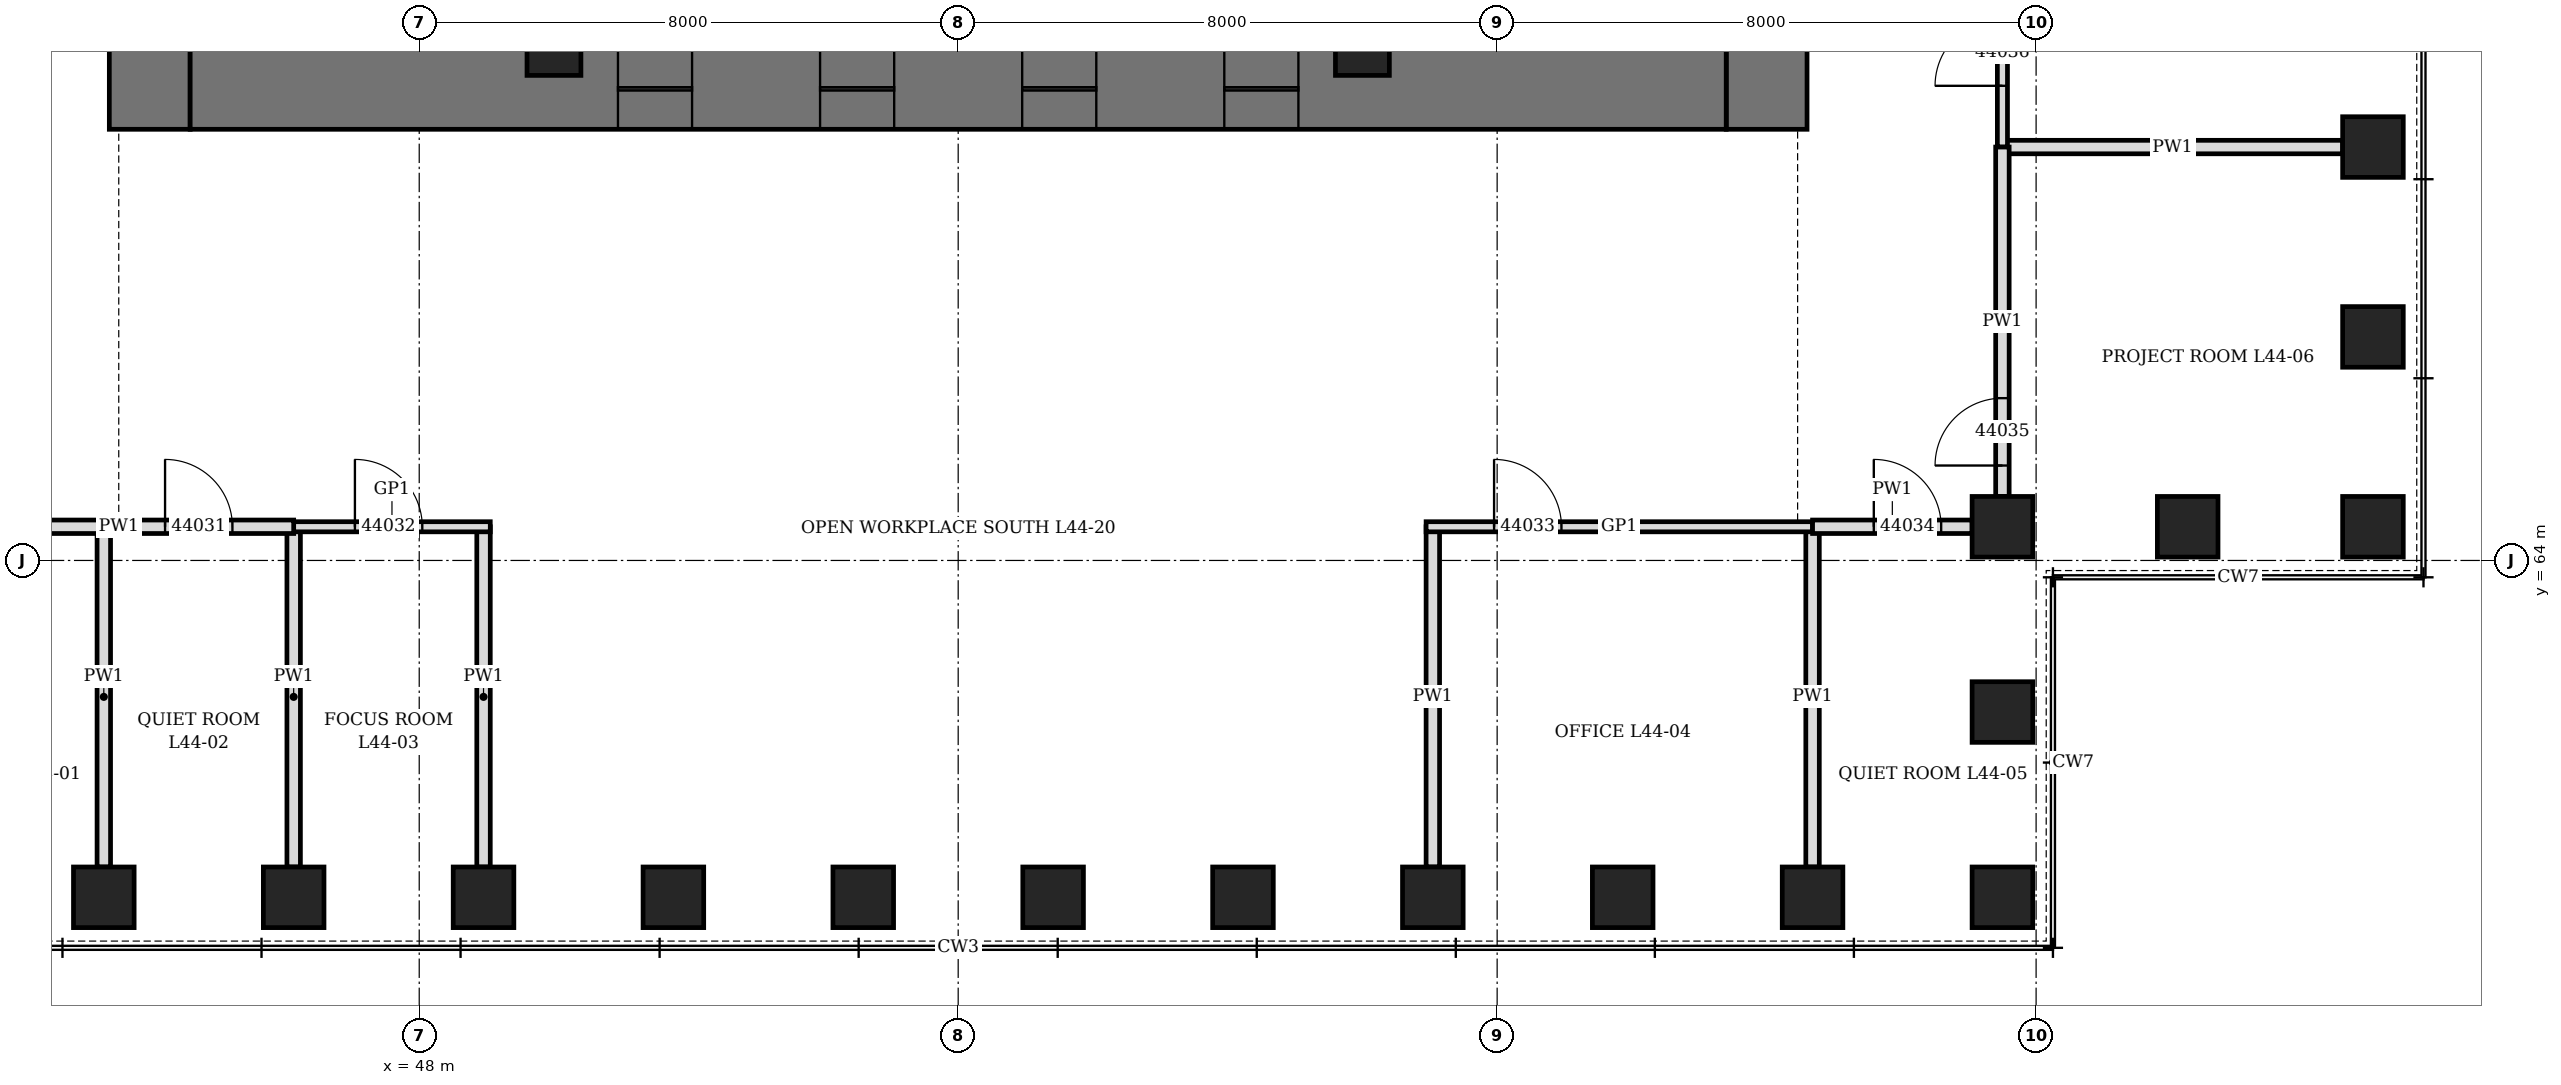
"""IFC4 building model, lengths in metres.
Left out: names, types, materials, properties, quantities, classifications, styles, units other than length and angle.
Written with IfcOpenShell. Run it as: python <this file> out.ifc"""

import sys

from ifc_helpers import new_model, si_unit, direction, frame, frame_2d, origin, origin_2d, place, context, subcontext, project, spatial, rectangle, hollow_rectangle, extrude, element, fill, save


model = new_model("IFC4")
c1 = context("Model", 3, precision=1e-05, world=origin(), true_north=direction((0.0, 1.0)))
c2 = subcontext(c1, "Body", "Model", "MODEL_VIEW")
j1 = project(units=[si_unit("LENGTHUNIT", "METRE"), si_unit("PLANEANGLEUNIT", "RADIAN")], contexts=[c1])
p1 = place(None, origin())
s1 = spatial("IfcSite", under=j1, at=p1, CompositionType="ELEMENT")
p2 = place(p1, origin())
s2 = spatial("IfcBuilding", under=s1, at=p2, CompositionType="ELEMENT")
p3 = place(p2, frame((0.0, 0.0, 198.1)))
s3 = spatial("IfcBuildingStorey", under=s2, at=p3, CompositionType="ELEMENT", Elevation=198.1)
for number, where, z_axis, x_axis in (
    (1, (43.318, 59.0, 0.0), (0.0, 0.0, 1.0), (1.0, 0.0, 0.0)),
    (2, (46.136, 59.0, 0.0), (0.0, 0.0, 1.0), (1.0, 0.0, 0.0)),
    (3, (48.955, 59.0, 0.0), (0.0, 0.0, 1.0), (1.0, 0.0, 0.0)),
    (4, (51.773, 59.0, 0.0), (0.0, 0.0, 1.0), (1.0, 0.0, 0.0)),
    (5, (54.591, 59.0, 0.0), (0.0, 0.0, 1.0), (1.0, 0.0, 0.0)),
    (6, (57.409, 59.0, 0.0), (0.0, 0.0, 1.0), (1.0, 0.0, 0.0)),
    (7, (60.227, 59.0, 0.0), (0.0, 0.0, 1.0), (1.0, 0.0, 0.0)),
    (8, (63.045, 59.0, 0.0), (0.0, 0.0, 1.0), (1.0, 0.0, 0.0)),
    (9, (65.864, 59.0, 0.0), (0.0, 0.0, 1.0), (1.0, 0.0, 0.0)),
    (10, (68.682, 59.0, 0.0), (0.0, 0.0, 1.0), (1.0, 0.0, 0.0)),
    (11, (71.5, 59.0, 0.0), (0.0, 0.0, 1.0), (0.0, 1.0, 0.0)),
    (12, (71.5, 61.75, 0.0), (0.0, 0.0, 1.0), (0.0, 1.0, 0.0)),
    (13, (71.5, 64.5, 0.0), (0.0, 0.0, 1.0), (1.0, 0.0, 0.0)),
    (14, (74.25, 64.5, 0.0), (0.0, 0.0, 1.0), (1.0, 0.0, 0.0)),
    (15, (77.0, 64.5, 0.0), (0.0, 0.0, 1.0), (0.0, 1.0, 0.0)),
    (16, (77.0, 67.318, 0.0), (0.0, 0.0, 1.0), (0.0, 1.0, 0.0)),
    (17, (77.0, 70.136, 0.0), (0.0, 0.0, 1.0), (0.0, 1.0, 0.0)),
):
    element("IfcColumn", number, at=place(p3, frame(where, z_axis=z_axis, x_axis=x_axis)), inside=s3, PredefinedType="COLUMN", context=c2, shape_type="SweptSolid", body=[
        extrude(hollow_rectangle(XDim=0.9, YDim=0.9, WallThickness=0.12, at=origin_2d()), origin(), (0.0, 0.0, 1.0), 4.2),
    ])
p4 = place(p3, frame((44.0, 70.4, 0.0), z_axis=(0.0, 0.0, 1.0), x_axis=(0.0, 1.0, 0.0)))
e18 = element("IfcWall", 18, at=p4, inside=s3, PredefinedType="SHEAR", context=c2, shape_type="SweptSolid", body=[
    extrude(rectangle(XDim=19.2, YDim=1.2, at=frame_2d((9.6, 0.0))), origin(), (0.0, 0.0, 1.0), 4.2),
])
p5 = place(p4, frame((8.6, 0.0, 0.0)))
e19 = element("IfcOpeningElement", 19, at=p5, cuts=e18, PredefinedType="OPENING", context=c2, shape_type="SweptSolid", body=[
    extrude(rectangle(XDim=2.0, YDim=2.4, at=frame_2d((1.0, 1.2))), frame((0.0, 0.61, 0.0), z_axis=(0.0, -1.0, 0.0), x_axis=(1.0, 0.0, 0.0)), (0.0, 0.0, 1.0), 1.22),
])
p6 = place(p3, frame((68.0, 70.4, 0.0), z_axis=(0.0, 0.0, 1.0), x_axis=(0.0, 1.0, 0.0)))
e20 = element("IfcWall", 20, at=p6, inside=s3, PredefinedType="SHEAR", context=c2, shape_type="SweptSolid", body=[
    extrude(rectangle(XDim=19.2, YDim=1.2, at=frame_2d((9.6, 0.0))), origin(), (0.0, 0.0, 1.0), 4.2),
])
p7 = place(p6, frame((8.6, 0.0, 0.0)))
e21 = element("IfcOpeningElement", 21, at=p7, cuts=e20, PredefinedType="OPENING", context=c2, shape_type="SweptSolid", body=[
    extrude(rectangle(XDim=2.0, YDim=2.4, at=frame_2d((1.0, 1.2))), frame((0.0, 0.61, 0.0), z_axis=(0.0, -1.0, 0.0), x_axis=(1.0, 0.0, 0.0)), (0.0, 0.0, 1.0), 1.22),
])
p8 = place(p3, frame((44.6, 71.0, 0.0), z_axis=(0.0, 0.0, 1.0), x_axis=(1.0, 0.0, 0.0)))
e22 = element("IfcWall", 22, at=p8, inside=s3, PredefinedType="SHEAR", context=c2, shape_type="SweptSolid", body=[
    extrude(rectangle(XDim=22.8, YDim=1.2, at=frame_2d((11.4, 0.0))), origin(), (0.0, 0.0, 1.0), 4.2),
])
p9 = place(p8, frame((6.35, 0.0, 0.0)))
e23 = element("IfcOpeningElement", 23, at=p9, cuts=e22, PredefinedType="OPENING", context=c2, shape_type="SweptSolid", body=[
    extrude(rectangle(XDim=1.1, YDim=2.2, at=frame_2d((0.55, 1.1))), frame((0.0, 0.61, 0.0), z_axis=(0.0, -1.0, 0.0), x_axis=(1.0, 0.0, 0.0)), (0.0, 0.0, 1.0), 1.22),
])
p10 = place(p8, frame((9.35, 0.0, 0.0)))
e24 = element("IfcOpeningElement", 24, at=p10, cuts=e22, PredefinedType="OPENING", context=c2, shape_type="SweptSolid", body=[
    extrude(rectangle(XDim=1.1, YDim=2.2, at=frame_2d((0.55, 1.1))), frame((0.0, 0.61, 0.0), z_axis=(0.0, -1.0, 0.0), x_axis=(1.0, 0.0, 0.0)), (0.0, 0.0, 1.0), 1.22),
])
p11 = place(p8, frame((12.35, 0.0, 0.0)))
e25 = element("IfcOpeningElement", 25, at=p11, cuts=e22, PredefinedType="OPENING", context=c2, shape_type="SweptSolid", body=[
    extrude(rectangle(XDim=1.1, YDim=2.2, at=frame_2d((0.55, 1.1))), frame((0.0, 0.61, 0.0), z_axis=(0.0, -1.0, 0.0), x_axis=(1.0, 0.0, 0.0)), (0.0, 0.0, 1.0), 1.22),
])
p12 = place(p8, frame((15.35, 0.0, 0.0)))
e26 = element("IfcOpeningElement", 26, at=p12, cuts=e22, PredefinedType="OPENING", context=c2, shape_type="SweptSolid", body=[
    extrude(rectangle(XDim=1.1, YDim=2.2, at=frame_2d((0.55, 1.1))), frame((0.0, 0.61, 0.0), z_axis=(0.0, -1.0, 0.0), x_axis=(1.0, 0.0, 0.0)), (0.0, 0.0, 1.0), 1.22),
])
for number, where, z_axis, x_axis in (
    (27, (50.0, 71.6, 0.0), (0.0, 0.0, 1.0), (1.0, 0.0, 0.0)),
    (28, (62.0, 71.6, 0.0), (0.0, 0.0, 1.0), (1.0, 0.0, 0.0)),
):
    element("IfcColumn", number, at=place(p3, frame(where, z_axis=z_axis, x_axis=x_axis)), inside=s3, PredefinedType="COLUMN", context=c2, shape_type="SweptSolid", body=[
        extrude(hollow_rectangle(XDim=0.8, YDim=0.8, WallThickness=0.1, at=origin_2d()), origin(), (0.0, 0.0, 1.0), 4.2),
    ])
for number, where, z_axis, x_axis in (
    (29, (43.318, 59.45, 0.0), (0.0, 0.0, 1.0), (0.0, 1.0, 0.0)),
    (30, (46.136, 59.45, 0.0), (0.0, 0.0, 1.0), (0.0, 1.0, 0.0)),
    (31, (48.955, 59.45, 0.0), (0.0, 0.0, 1.0), (0.0, 1.0, 0.0)),
    (32, (63.045, 59.45, 0.0), (0.0, 0.0, 1.0), (0.0, 1.0, 0.0)),
    (33, (68.682, 59.45, 0.0), (0.0, 0.0, 1.0), (0.0, 1.0, 0.0)),
    (34, (71.5, 70.136, 0.0), (0.0, 0.0, 1.0), (1.0, 0.0, 0.0)),
):
    element("IfcWall", number, at=place(p3, frame(where, z_axis=z_axis, x_axis=x_axis)), inside=s3, PredefinedType="PARTITIONING", context=c2, shape_type="SweptSolid", body=[
        extrude(rectangle(XDim=5.05, YDim=0.2, at=frame_2d((2.525, 0.0))), origin(), (0.0, 0.0, 1.0), 3.428),
    ])
p13 = place(p3, frame((46.136, 64.5, 0.0), z_axis=(0.0, 0.0, 1.0), x_axis=(1.0, 0.0, 0.0)))
e35 = element("IfcWall", 35, at=p13, inside=s3, PredefinedType="PARTITIONING", context=c2, shape_type="SweptSolid", body=[
    extrude(rectangle(XDim=2.918, YDim=0.15, at=frame_2d((1.459, 0.0))), origin(), (0.0, 0.0, 1.0), 4.04),
])
p14 = place(p13, frame((0.909, 0.0, 0.0)))
e36 = element("IfcOpeningElement", 36, at=p14, cuts=e35, PredefinedType="OPENING", context=c2, shape_type="SweptSolid", body=[
    extrude(rectangle(XDim=1.0, YDim=2.4, at=frame_2d((0.5, 1.2))), frame((0.0, 0.085, 0.0), z_axis=(0.0, -1.0, 0.0), x_axis=(1.0, 0.0, 0.0)), (0.0, 0.0, 1.0), 0.17),
])
p15 = place(p3, frame((62.946, 64.5, 0.0), z_axis=(0.0, 0.0, 1.0), x_axis=(1.0, 0.0, 0.0)))
e37 = element("IfcWall", 37, at=p15, inside=s3, PredefinedType="PARTITIONING", context=c2, shape_type="SweptSolid", body=[
    extrude(rectangle(XDim=5.736, YDim=0.15, at=frame_2d((2.868, 0.0))), origin(), (0.0, 0.0, 1.0), 4.04),
])
p16 = place(p15, frame((1.009, 0.0, 0.0)))
e38 = element("IfcOpeningElement", 38, at=p16, cuts=e37, PredefinedType="OPENING", context=c2, shape_type="SweptSolid", body=[
    extrude(rectangle(XDim=1.0, YDim=2.1, at=frame_2d((0.5, 1.05))), frame((0.0, 0.085, 0.0), z_axis=(0.0, -1.0, 0.0), x_axis=(1.0, 0.0, 0.0)), (0.0, 0.0, 1.0), 0.17),
])
p17 = place(p3, frame((40.95, 64.5, 0.0), z_axis=(0.0, 0.0, 1.0), x_axis=(1.0, 0.0, 0.0)))
e39 = element("IfcWall", 39, at=p17, inside=s3, PredefinedType="PARTITIONING", context=c2, shape_type="SweptSolid", body=[
    extrude(rectangle(XDim=5.187, YDim=0.2, at=frame_2d((2.593, 0.0))), origin(), (0.0, 0.0, 1.0), 4.04),
])
p18 = place(p17, frame((0.459, 0.0, 0.0)))
e40 = element("IfcOpeningElement", 40, at=p18, cuts=e39, PredefinedType="OPENING", context=c2, shape_type="SweptSolid", body=[
    extrude(rectangle(XDim=1.0, YDim=2.1, at=frame_2d((0.5, 1.05))), frame((0.0, 0.11, 0.0), z_axis=(0.0, -1.0, 0.0), x_axis=(1.0, 0.0, 0.0)), (0.0, 0.0, 1.0), 0.22),
])
p19 = place(p17, frame((3.277, 0.0, 0.0)))
e41 = element("IfcOpeningElement", 41, at=p19, cuts=e39, PredefinedType="OPENING", context=c2, shape_type="SweptSolid", body=[
    extrude(rectangle(XDim=1.0, YDim=2.1, at=frame_2d((0.5, 1.05))), frame((0.0, 0.11, 0.0), z_axis=(0.0, -1.0, 0.0), x_axis=(1.0, 0.0, 0.0)), (0.0, 0.0, 1.0), 0.22),
])
p20 = place(p3, frame((68.682, 64.5, 0.0), z_axis=(0.0, 0.0, 1.0), x_axis=(1.0, 0.0, 0.0)))
e42 = element("IfcWall", 42, at=p20, inside=s3, PredefinedType="PARTITIONING", context=c2, shape_type="SweptSolid", body=[
    extrude(rectangle(XDim=2.368, YDim=0.2, at=frame_2d((1.184, 0.0))), origin(), (0.0, 0.0, 1.0), 4.04),
])
p21 = place(p20, frame((0.909, 0.0, 0.0)))
e43 = element("IfcOpeningElement", 43, at=p21, cuts=e42, PredefinedType="OPENING", context=c2, shape_type="SweptSolid", body=[
    extrude(rectangle(XDim=1.0, YDim=2.1, at=frame_2d((0.5, 1.05))), frame((0.0, 0.11, 0.0), z_axis=(0.0, -1.0, 0.0), x_axis=(1.0, 0.0, 0.0)), (0.0, 0.0, 1.0), 0.22),
])
p22 = place(p3, frame((71.5, 70.136, 0.0), z_axis=(0.0, 0.0, 1.0), x_axis=(0.0, 1.0, 0.0)))
e44 = element("IfcWall", 44, at=p22, inside=s3, PredefinedType="PARTITIONING", context=c2, shape_type="SweptSolid", body=[
    extrude(rectangle(XDim=22.545, YDim=0.15, at=frame_2d((11.273, 0.0))), origin(), (0.0, 0.0, 1.0), 4.04),
])
p23 = place(p22, frame((0.909, 0.0, 0.0)))
e45 = element("IfcOpeningElement", 45, at=p23, cuts=e44, PredefinedType="OPENING", context=c2, shape_type="SweptSolid", body=[
    extrude(rectangle(XDim=1.0, YDim=2.1, at=frame_2d((0.5, 1.05))), frame((0.0, 0.085, 0.0), z_axis=(0.0, -1.0, 0.0), x_axis=(1.0, 0.0, 0.0)), (0.0, 0.0, 1.0), 0.17),
])
p24 = place(p22, frame((6.545, 0.0, 0.0)))
e46 = element("IfcOpeningElement", 46, at=p24, cuts=e44, PredefinedType="OPENING", context=c2, shape_type="SweptSolid", body=[
    extrude(rectangle(XDim=1.0, YDim=2.1, at=frame_2d((0.5, 1.05))), frame((0.0, 0.085, 0.0), z_axis=(0.0, -1.0, 0.0), x_axis=(1.0, 0.0, 0.0)), (0.0, 0.0, 1.0), 0.17),
])
p25 = place(p22, frame((12.182, 0.0, 0.0)))
e47 = element("IfcOpeningElement", 47, at=p25, cuts=e44, PredefinedType="OPENING", context=c2, shape_type="SweptSolid", body=[
    extrude(rectangle(XDim=1.0, YDim=2.1, at=frame_2d((0.5, 1.05))), frame((0.0, 0.085, 0.0), z_axis=(0.0, -1.0, 0.0), x_axis=(1.0, 0.0, 0.0)), (0.0, 0.0, 1.0), 0.17),
])
p26 = place(p22, frame((17.818, 0.0, 0.0)))
e48 = element("IfcOpeningElement", 48, at=p26, cuts=e44, PredefinedType="OPENING", context=c2, shape_type="SweptSolid", body=[
    extrude(rectangle(XDim=1.0, YDim=2.1, at=frame_2d((0.5, 1.05))), frame((0.0, 0.085, 0.0), z_axis=(0.0, -1.0, 0.0), x_axis=(1.0, 0.0, 0.0)), (0.0, 0.0, 1.0), 0.17),
])
p27 = place(p3, frame((71.5, 64.95, 0.0), z_axis=(0.0, 0.0, 1.0), x_axis=(0.0, 1.0, 0.0)))
e49 = element("IfcWall", 49, at=p27, inside=s3, PredefinedType="PARTITIONING", context=c2, shape_type="SweptSolid", body=[
    extrude(rectangle(XDim=5.187, YDim=0.2, at=frame_2d((2.593, 0.0))), origin(), (0.0, 0.0, 1.0), 4.04),
])
p28 = place(p27, frame((0.459, 0.0, 0.0)))
e50 = element("IfcOpeningElement", 50, at=p28, cuts=e49, PredefinedType="OPENING", context=c2, shape_type="SweptSolid", body=[
    extrude(rectangle(XDim=1.0, YDim=2.1, at=frame_2d((0.5, 1.05))), frame((0.0, 0.11, 0.0), z_axis=(0.0, -1.0, 0.0), x_axis=(1.0, 0.0, 0.0)), (0.0, 0.0, 1.0), 0.22),
])
p29 = place(p9, origin())
e51 = element("IfcDoor", 51, at=p29, inside=s3, OperationType="SLIDING_TO_LEFT", PredefinedType="DOOR", context=c2, shape_type="SweptSolid", body=[
    extrude(rectangle(XDim=1.1, YDim=2.2, at=frame_2d((0.55, 1.1))), frame((0.0, 0.35, 0.0), z_axis=(0.0, -1.0, 0.0), x_axis=(1.0, 0.0, 0.0)), (0.0, 0.0, 1.0), 0.7),
])
fill(e23, e51)
p30 = place(p10, origin())
e52 = element("IfcDoor", 52, at=p30, inside=s3, OperationType="SLIDING_TO_LEFT", PredefinedType="DOOR", context=c2, shape_type="SweptSolid", body=[
    extrude(rectangle(XDim=1.1, YDim=2.2, at=frame_2d((0.55, 1.1))), frame((0.0, 0.35, 0.0), z_axis=(0.0, -1.0, 0.0), x_axis=(1.0, 0.0, 0.0)), (0.0, 0.0, 1.0), 0.7),
])
fill(e24, e52)
p31 = place(p11, origin())
e53 = element("IfcDoor", 53, at=p31, inside=s3, OperationType="SLIDING_TO_LEFT", PredefinedType="DOOR", context=c2, shape_type="SweptSolid", body=[
    extrude(rectangle(XDim=1.1, YDim=2.2, at=frame_2d((0.55, 1.1))), frame((0.0, 0.35, 0.0), z_axis=(0.0, -1.0, 0.0), x_axis=(1.0, 0.0, 0.0)), (0.0, 0.0, 1.0), 0.7),
])
fill(e25, e53)
p32 = place(p12, origin())
e54 = element("IfcDoor", 54, at=p32, inside=s3, OperationType="SLIDING_TO_LEFT", PredefinedType="DOOR", context=c2, shape_type="SweptSolid", body=[
    extrude(rectangle(XDim=1.1, YDim=2.2, at=frame_2d((0.55, 1.1))), frame((0.0, 0.35, 0.0), z_axis=(0.0, -1.0, 0.0), x_axis=(1.0, 0.0, 0.0)), (0.0, 0.0, 1.0), 0.7),
])
fill(e26, e54)
p33 = place(p19, origin())
e55 = element("IfcDoor", 55, at=p33, inside=s3, OperationType="SINGLE_SWING_LEFT", PredefinedType="DOOR", context=c2, shape_type="SweptSolid", body=[
    extrude(rectangle(XDim=1.0, YDim=2.1, at=frame_2d((0.5, 1.05))), frame((0.0, 0.1, 0.0), z_axis=(0.0, -1.0, 0.0), x_axis=(1.0, 0.0, 0.0)), (0.0, 0.0, 1.0), 0.199),
])
fill(e41, e55)
p34 = place(p14, origin())
e56 = element("IfcDoor", 56, at=p34, inside=s3, OperationType="SINGLE_SWING_RIGHT", PredefinedType="DOOR", context=c2, shape_type="SweptSolid", body=[
    extrude(rectangle(XDim=1.0, YDim=2.4, at=frame_2d((0.5, 1.2))), frame((0.0, 0.075, 0.0), z_axis=(0.0, -1.0, 0.0), x_axis=(1.0, 0.0, 0.0)), (0.0, 0.0, 1.0), 0.149),
])
fill(e36, e56)
p35 = place(p16, origin())
e57 = element("IfcDoor", 57, at=p35, inside=s3, OperationType="SINGLE_SWING_LEFT", PredefinedType="DOOR", context=c2, shape_type="SweptSolid", body=[
    extrude(rectangle(XDim=1.0, YDim=2.1, at=frame_2d((0.5, 1.05))), frame((0.0, 0.075, 0.0), z_axis=(0.0, -1.0, 0.0), x_axis=(1.0, 0.0, 0.0)), (0.0, 0.0, 1.0), 0.149),
])
fill(e38, e57)
p36 = place(p21, origin())
e58 = element("IfcDoor", 58, at=p36, inside=s3, OperationType="SINGLE_SWING_LEFT", PredefinedType="DOOR", context=c2, shape_type="SweptSolid", body=[
    extrude(rectangle(XDim=1.0, YDim=2.1, at=frame_2d((0.5, 1.05))), frame((0.0, 0.1, 0.0), z_axis=(0.0, -1.0, 0.0), x_axis=(1.0, 0.0, 0.0)), (0.0, 0.0, 1.0), 0.199),
])
fill(e43, e58)
p37 = place(p28, origin())
e59 = element("IfcDoor", 59, at=p37, inside=s3, OperationType="SINGLE_SWING_LEFT", PredefinedType="DOOR", context=c2, shape_type="SweptSolid", body=[
    extrude(rectangle(XDim=1.0, YDim=2.1, at=frame_2d((0.5, 1.05))), frame((0.0, 0.1, 0.0), z_axis=(0.0, -1.0, 0.0), x_axis=(1.0, 0.0, 0.0)), (0.0, 0.0, 1.0), 0.199),
])
fill(e50, e59)
p38 = place(p23, origin())
e60 = element("IfcDoor", 60, at=p38, inside=s3, OperationType="SINGLE_SWING_LEFT", PredefinedType="DOOR", context=c2, shape_type="SweptSolid", body=[
    extrude(rectangle(XDim=1.0, YDim=2.1, at=frame_2d((0.5, 1.05))), frame((0.0, 0.075, 0.0), z_axis=(0.0, -1.0, 0.0), x_axis=(1.0, 0.0, 0.0)), (0.0, 0.0, 1.0), 0.149),
])
fill(e45, e60)
save(model, sys.argv[1])
